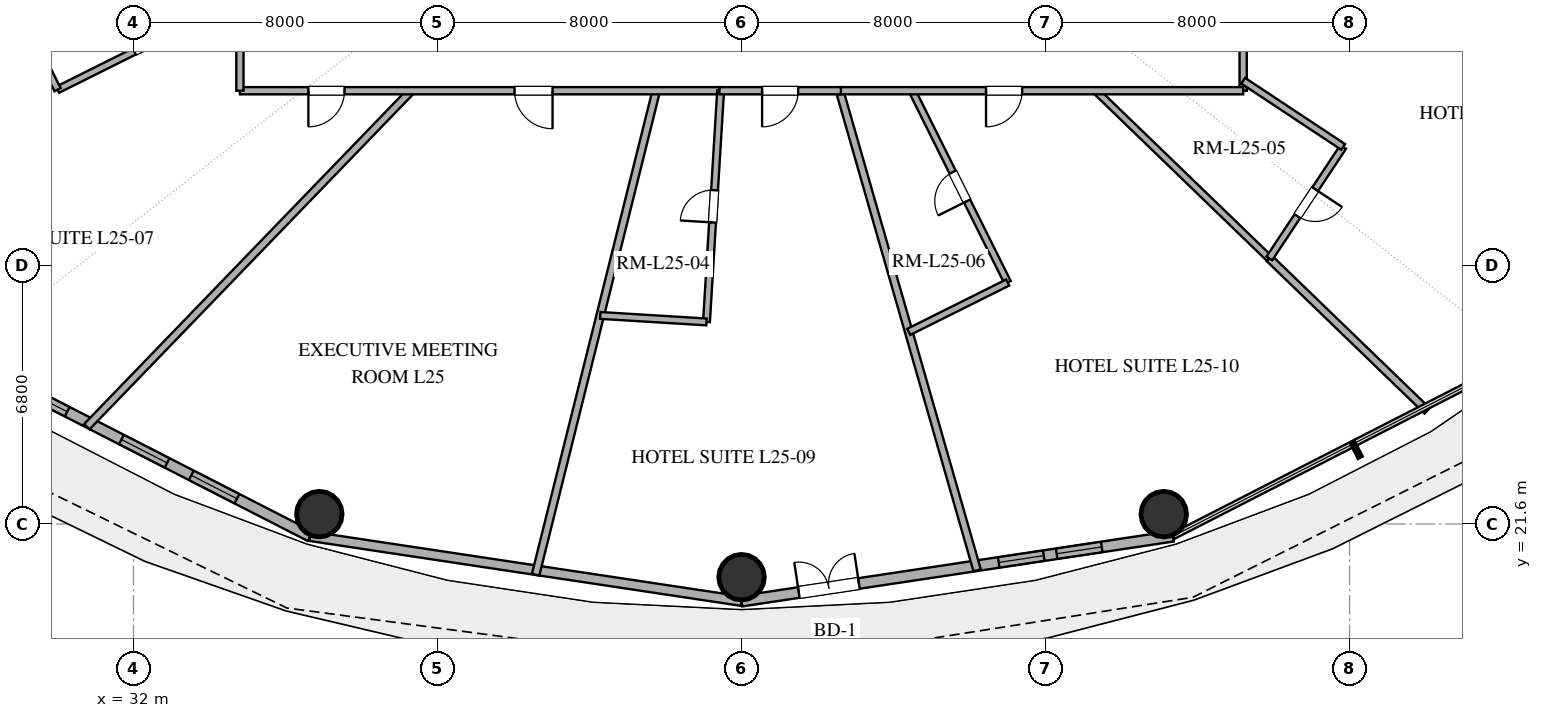
"""IFC4 building model, lengths in metres.
Left out: names, types, materials, properties, quantities, classifications, styles, units other than length and angle.
Written with IfcOpenShell. Run it as: python <this file> out.ifc"""

import sys

from ifc_helpers import new_model, si_unit, direction, frame, frame_2d, origin, origin_2d, place, context, subcontext, project, spatial, rectangle, hollow_circle, extrude, element, fill, save


model = new_model("IFC4")
c1 = context("Model", 3, precision=1e-05, world=origin(), true_north=direction((0.0, 1.0)))
c2 = subcontext(c1, "Body", "Model", "MODEL_VIEW")
j1 = project(units=[si_unit("LENGTHUNIT", "METRE"), si_unit("PLANEANGLEUNIT", "RADIAN")], contexts=[c1])
p1 = place(None, origin())
s1 = spatial("IfcSite", under=j1, at=p1, CompositionType="ELEMENT")
p2 = place(p1, origin())
s2 = spatial("IfcBuilding", under=s1, at=p2, CompositionType="ELEMENT")
p3 = place(p2, frame((0.0, 0.0, 102.0)))
s3 = spatial("IfcBuildingStorey", under=s2, at=p3, CompositionType="ELEMENT", Elevation=102.0)
for number, where, z_axis, x_axis in (
    (1, (36.89, 21.859, 0.0), (0.0, 0.0, 1.0), (1.0, 0.0, 0.0)),
    (2, (48.0, 20.2, 0.0), (0.0, 0.0, 1.0), (1.0, 0.0, 0.0)),
    (3, (59.11, 21.859, 0.0), (0.0, 0.0, 1.0), (1.0, 0.0, 0.0)),
):
    element("IfcColumn", number, at=place(p3, frame(where, z_axis=z_axis, x_axis=x_axis)), inside=s3, PredefinedType="COLUMN", context=c2, shape_type="SweptSolid", body=[
        extrude(hollow_circle(Radius=0.6, WallThickness=0.032, at=origin_2d()), origin(), (0.0, 0.0, 1.0), 3.38),
    ])
p4 = place(p3, frame((27.16, 26.14, 0.0), z_axis=(0.0, 0.0, 1.0), x_axis=(0.889959505023, -0.45603955905, 0.0)))
e4 = element("IfcWall", 4, at=p4, inside=s3, PredefinedType="SOLIDWALL", context=c2, shape_type="SweptSolid", body=[
    extrude(rectangle(XDim=10.662, YDim=0.28, at=frame_2d((5.331, 0.0))), origin(), (0.0, 0.0, 1.0), 3.38),
])
p5 = place(p4, frame((1.979, 0.0, 0.85)))
e5 = element("IfcOpeningElement", 5, at=p5, cuts=e4, PredefinedType="OPENING", context=c2, shape_type="SweptSolid", body=[
    extrude(rectangle(XDim=1.5, YDim=1.8, at=frame_2d((0.75, 0.9))), frame((0.0, 0.15, 0.0), z_axis=(0.0, -1.0, 0.0), x_axis=(1.0, 0.0, 0.0)), (0.0, 0.0, 1.0), 0.3),
])
p6 = place(p4, frame((5.082, 0.0, 0.85)))
e6 = element("IfcOpeningElement", 6, at=p6, cuts=e4, PredefinedType="OPENING", context=c2, shape_type="SweptSolid", body=[
    extrude(rectangle(XDim=1.35, YDim=1.8, at=frame_2d((0.675, 0.9))), frame((0.0, 0.15, 0.0), z_axis=(0.0, -1.0, 0.0), x_axis=(1.0, 0.0, 0.0)), (0.0, 0.0, 1.0), 0.3),
])
p7 = place(p4, frame((7.146, 0.0, 0.85)))
e7 = element("IfcOpeningElement", 7, at=p7, cuts=e4, PredefinedType="OPENING", context=c2, shape_type="SweptSolid", body=[
    extrude(rectangle(XDim=1.35, YDim=1.8, at=frame_2d((0.675, 0.9))), frame((0.0, 0.15, 0.0), z_axis=(0.0, -1.0, 0.0), x_axis=(1.0, 0.0, 0.0)), (0.0, 0.0, 1.0), 0.3),
])
p8 = place(p3, frame((36.649, 21.277, 0.0), z_axis=(0.0, 0.0, 1.0), x_axis=(0.988877774656, -0.148730450117, 0.0)))
e8 = element("IfcWall", 8, at=p8, inside=s3, PredefinedType="SOLIDWALL", context=c2, shape_type="SweptSolid", body=[
    extrude(rectangle(XDim=11.479, YDim=0.25, at=frame_2d((5.74, 0.0))), origin(), (0.0, 0.0, 1.0), 3.38),
])
p9 = place(p3, frame((48.0, 19.57, 0.0), z_axis=(0.0, 0.0, 1.0), x_axis=(0.988877774656, 0.148730450117, 0.0)))
e9 = element("IfcWall", 9, at=p9, inside=s3, PredefinedType="SOLIDWALL", context=c2, shape_type="SweptSolid", body=[
    extrude(rectangle(XDim=11.479, YDim=0.28, at=frame_2d((5.74, 0.0))), origin(), (0.0, 0.0, 1.0), 3.38),
])
p10 = place(p9, frame((1.524, 0.0, 0.0)))
e10 = element("IfcOpeningElement", 10, at=p10, cuts=e9, PredefinedType="OPENING", context=c2, shape_type="SweptSolid", body=[
    extrude(rectangle(XDim=1.6, YDim=2.25, at=frame_2d((0.8, 1.125))), frame((0.0, 0.15, 0.0), z_axis=(0.0, -1.0, 0.0), x_axis=(1.0, 0.0, 0.0)), (0.0, 0.0, 1.0), 0.3),
])
p11 = place(p9, frame((6.843, 0.0, 0.85)))
e11 = element("IfcOpeningElement", 11, at=p11, cuts=e9, PredefinedType="OPENING", context=c2, shape_type="SweptSolid", body=[
    extrude(rectangle(XDim=1.2, YDim=1.6, at=frame_2d((0.6, 0.8))), frame((0.0, 0.15, 0.0), z_axis=(0.0, -1.0, 0.0), x_axis=(1.0, 0.0, 0.0)), (0.0, 0.0, 1.0), 0.3),
])
p12 = place(p9, frame((8.385, 0.0, 0.85)))
e12 = element("IfcOpeningElement", 12, at=p12, cuts=e9, PredefinedType="OPENING", context=c2, shape_type="SweptSolid", body=[
    extrude(rectangle(XDim=1.2, YDim=1.6, at=frame_2d((0.6, 0.8))), frame((0.0, 0.15, 0.0), z_axis=(0.0, -1.0, 0.0), x_axis=(1.0, 0.0, 0.0)), (0.0, 0.0, 1.0), 0.3),
])
p13 = place(p3, frame((30.772, 24.16, 0.0), z_axis=(0.0, 0.0, 1.0), x_axis=(0.694672506389, 0.719326149161, 0.0)))
e13 = element("IfcWall", 13, at=p13, inside=s3, PredefinedType="PARTITIONING", context=c2, shape_type="SweptSolid", body=[
    extrude(rectangle(XDim=12.289, YDim=0.2, at=frame_2d((6.145, 0.0))), origin(), (0.0, 0.0, 1.0), 2.74),
])
p14 = place(p3, frame((45.756, 33.0, 0.0), z_axis=(0.0, 0.0, 1.0), x_axis=(-0.241918476077, -0.970296578852, 0.0)))
e14 = element("IfcWall", 14, at=p14, inside=s3, PredefinedType="PARTITIONING", context=c2, shape_type="SweptSolid", body=[
    extrude(rectangle(XDim=13.125, YDim=0.2, at=frame_2d((6.563, 0.0))), origin(), (0.0, 0.0, 1.0), 2.74),
])
p15 = place(p3, frame((50.581, 33.0, 0.0), z_axis=(0.0, 0.0, 1.0), x_axis=(0.275639731411, -0.961261014745, 0.0)))
e15 = element("IfcWall", 15, at=p15, inside=s3, PredefinedType="PARTITIONING", context=c2, shape_type="SweptSolid", body=[
    extrude(rectangle(XDim=13.126, YDim=0.2, at=frame_2d((6.563, 0.0))), origin(), (0.0, 0.0, 1.0), 2.74),
])
p16 = place(p3, frame((47.482, 33.0, 0.0), z_axis=(0.0, 0.0, 1.0), x_axis=(-1.0, 0.0, 0.0)))
e16 = element("IfcWall", 16, at=p16, inside=s3, PredefinedType="PARTITIONING", context=c2, shape_type="SweptSolid", body=[
    extrude(rectangle(XDim=12.682, YDim=0.19, at=frame_2d((6.341, 0.0))), origin(), (0.0, 0.0, 1.0), 2.74),
])
p17 = place(p16, frame((4.455, 0.0, 0.0)))
e17 = element("IfcOpeningElement", 17, at=p17, cuts=e16, PredefinedType="OPENING", context=c2, shape_type="SweptSolid", body=[
    extrude(rectangle(XDim=1.0, YDim=2.2, at=frame_2d((0.5, 1.1))), frame((0.0, 0.105, 0.0), z_axis=(0.0, -1.0, 0.0), x_axis=(1.0, 0.0, 0.0)), (0.0, 0.0, 1.0), 0.21),
])
p18 = place(p16, frame((9.93, 0.0, 0.0)))
e18 = element("IfcOpeningElement", 18, at=p18, cuts=e16, PredefinedType="OPENING", context=c2, shape_type="SweptSolid", body=[
    extrude(rectangle(XDim=0.95, YDim=2.15, at=frame_2d((0.475, 1.075))), frame((0.0, 0.105, 0.0), z_axis=(0.0, -1.0, 0.0), x_axis=(1.0, 0.0, 0.0)), (0.0, 0.0, 1.0), 0.21),
])
p19 = place(p3, frame((61.889, 28.587, 0.0), z_axis=(0.0, 0.0, 1.0), x_axis=(-0.719318009274, 0.694680935059, 0.0)))
e19 = element("IfcWall", 19, at=p19, inside=s3, PredefinedType="PLUMBINGWALL", context=c2, shape_type="SweptSolid", body=[
    extrude(rectangle(XDim=6.352, YDim=0.18, at=frame_2d((3.176, 0.0))), origin(), (0.0, 0.0, 1.0), 2.74),
])
p20 = place(p3, frame((47.077, 26.916, 0.0), z_axis=(0.0, 0.0, 1.0), x_axis=(0.061044096749, 0.998135070144, 0.0)))
e20 = element("IfcWall", 20, at=p20, inside=s3, PredefinedType="PLUMBINGWALL", context=c2, shape_type="SweptSolid", body=[
    extrude(rectangle(XDim=6.095, YDim=0.18, at=frame_2d((3.048, 0.0))), origin(), (0.0, 0.0, 1.0), 2.74),
])
p21 = place(p20, frame((2.623, 0.0, 0.0)))
e21 = element("IfcOpeningElement", 21, at=p21, cuts=e20, PredefinedType="OPENING", context=c2, shape_type="SweptSolid", body=[
    extrude(rectangle(XDim=0.85, YDim=2.1, at=frame_2d((0.425, 1.05))), frame((0.0, 0.1, 0.0), z_axis=(0.0, -1.0, 0.0), x_axis=(1.0, 0.0, 0.0)), (0.0, 0.0, 1.0), 0.2),
])
p22 = place(p3, frame((66.041, 24.578, 0.0), z_axis=(0.0, 0.0, 1.0), x_axis=(-0.719370121813, 0.694626970281, 0.0)))
e22 = element("IfcWall", 22, at=p22, inside=s3, PredefinedType="PARTITIONING", context=c2, shape_type="SweptSolid", body=[
    extrude(rectangle(XDim=5.772, YDim=0.2, at=frame_2d((2.886, 0.0))), origin(), (0.0, 0.0, 1.0), 2.74),
])
p23 = place(p3, frame((55.003, 27.953, 0.0), z_axis=(0.0, 0.0, 1.0), x_axis=(-0.446174269641, 0.894946099556, 0.0)))
e23 = element("IfcWall", 23, at=p23, inside=s3, PredefinedType="PLUMBINGWALL", context=c2, shape_type="SweptSolid", body=[
    extrude(rectangle(XDim=5.639, YDim=0.18, at=frame_2d((2.82, 0.0))), origin(), (0.0, 0.0, 1.0), 2.74),
])
p24 = place(p23, frame((2.395, 0.0, 0.0)))
e24 = element("IfcOpeningElement", 24, at=p24, cuts=e23, PredefinedType="OPENING", context=c2, shape_type="SweptSolid", body=[
    extrude(rectangle(XDim=0.85, YDim=2.1, at=frame_2d((0.425, 1.05))), frame((0.0, 0.1, 0.0), z_axis=(0.0, -1.0, 0.0), x_axis=(1.0, 0.0, 0.0)), (0.0, 0.0, 1.0), 0.2),
])
p25 = place(p3, frame((61.2, 41.225, 0.0), z_axis=(0.0, 0.0, 1.0), x_axis=(0.0, -1.0, 0.0)))
e25 = element("IfcWall", 25, at=p25, inside=s3, PredefinedType="PARTITIONING", context=c2, shape_type="SweptSolid", body=[
    extrude(rectangle(XDim=8.225, YDim=0.19, at=frame_2d((4.112, 0.0))), origin(), (0.0, 0.0, 1.0), 2.74),
])
p26 = place(p25, frame((4.767, 0.0, 0.0)))
e26 = element("IfcOpeningElement", 26, at=p26, cuts=e25, PredefinedType="OPENING", context=c2, shape_type="SweptSolid", body=[
    extrude(rectangle(XDim=0.95, YDim=2.15, at=frame_2d((0.475, 1.075))), frame((0.0, 0.105, 0.0), z_axis=(0.0, -1.0, 0.0), x_axis=(1.0, 0.0, 0.0)), (0.0, 0.0, 1.0), 0.21),
])
p27 = place(p3, frame((30.002, 33.027, 0.0), z_axis=(0.0, 0.0, 1.0), x_axis=(0.894936648514, 0.446193226244, 0.0)))
e27 = element("IfcWall", 27, at=p27, inside=s3, PredefinedType="PLUMBINGWALL", context=c2, shape_type="SweptSolid", body=[
    extrude(rectangle(XDim=5.361, YDim=0.18, at=frame_2d((2.681, 0.0))), origin(), (0.0, 0.0, 1.0), 2.74),
])
p28 = place(p27, frame((2.256, 0.0, 0.0)))
e28 = element("IfcOpeningElement", 28, at=p28, cuts=e27, PredefinedType="OPENING", context=c2, shape_type="SweptSolid", body=[
    extrude(rectangle(XDim=0.85, YDim=2.1, at=frame_2d((0.425, 1.05))), frame((0.0, 0.1, 0.0), z_axis=(0.0, -1.0, 0.0), x_axis=(1.0, 0.0, 0.0)), (0.0, 0.0, 1.0), 0.2),
])
p29 = place(p3, frame((61.2, 33.0, 0.0), z_axis=(0.0, 0.0, 1.0), x_axis=(-1.0, 0.0, 0.0)))
e29 = element("IfcWall", 29, at=p29, inside=s3, PredefinedType="PARTITIONING", context=c2, shape_type="SweptSolid", body=[
    extrude(rectangle(XDim=10.653, YDim=0.19, at=frame_2d((5.326, 0.0))), origin(), (0.0, 0.0, 1.0), 2.74),
])
p30 = place(p29, frame((5.816, 0.0, 0.0)))
e30 = element("IfcOpeningElement", 30, at=p30, cuts=e29, PredefinedType="OPENING", context=c2, shape_type="SweptSolid", body=[
    extrude(rectangle(XDim=0.95, YDim=2.15, at=frame_2d((0.475, 1.075))), frame((0.0, 0.105, 0.0), z_axis=(0.0, -1.0, 0.0), x_axis=(1.0, 0.0, 0.0)), (0.0, 0.0, 1.0), 0.21),
])
p31 = place(p3, frame((34.8, 33.0, 0.0), z_axis=(0.0, 0.0, 1.0), x_axis=(0.0, 1.0, 0.0)))
e31 = element("IfcWall", 31, at=p31, inside=s3, PredefinedType="PARTITIONING", context=c2, shape_type="SweptSolid", body=[
    extrude(rectangle(XDim=9.839, YDim=0.19, at=frame_2d((4.92, 0.0))), origin(), (0.0, 0.0, 1.0), 2.74),
])
p32 = place(p31, frame((7.035, 0.0, 0.0)))
e32 = element("IfcOpeningElement", 32, at=p32, cuts=e31, PredefinedType="OPENING", context=c2, shape_type="SweptSolid", body=[
    extrude(rectangle(XDim=0.95, YDim=2.15, at=frame_2d((0.475, 1.075))), frame((0.0, 0.105, 0.0), z_axis=(0.0, -1.0, 0.0), x_axis=(1.0, 0.0, 0.0)), (0.0, 0.0, 1.0), 0.21),
])
p33 = place(p3, frame((28.339, 36.362, 0.0), z_axis=(0.0, 0.0, 1.0), x_axis=(0.446243949247, -0.894911357488, 0.0)))
e33 = element("IfcWall", 33, at=p33, inside=s3, PredefinedType="PLUMBINGWALL", context=c2, shape_type="SweptSolid", body=[
    extrude(rectangle(XDim=3.727, YDim=0.18, at=frame_2d((1.864, 0.0))), origin(), (0.0, 0.0, 1.0), 2.74),
])
p34 = place(p3, frame((63.831, 31.521, 0.0), z_axis=(0.0, 0.0, 1.0), x_axis=(-0.551959146688, -0.833871153349, 0.0)))
e34 = element("IfcWall", 34, at=p34, inside=s3, PredefinedType="PLUMBINGWALL", context=c2, shape_type="SweptSolid", body=[
    extrude(rectangle(XDim=3.519, YDim=0.18, at=frame_2d((1.759, 0.0))), origin(), (0.0, 0.0, 1.0), 2.74),
])
p35 = place(p34, frame((1.334, 0.0, 0.0)))
e35 = element("IfcOpeningElement", 35, at=p35, cuts=e34, PredefinedType="OPENING", context=c2, shape_type="SweptSolid", body=[
    extrude(rectangle(XDim=0.85, YDim=2.1, at=frame_2d((0.425, 1.05))), frame((0.0, 0.1, 0.0), z_axis=(0.0, -1.0, 0.0), x_axis=(1.0, 0.0, 0.0)), (0.0, 0.0, 1.0), 0.2),
])
p36 = place(p3, frame((50.614, 33.0, 0.0), z_axis=(0.0, 0.0, 1.0), x_axis=(-1.0, 0.0, 0.0)))
e36 = element("IfcWall", 36, at=p36, inside=s3, PredefinedType="PARTITIONING", context=c2, shape_type="SweptSolid", body=[
    extrude(rectangle(XDim=3.197, YDim=0.19, at=frame_2d((1.598, 0.0))), origin(), (0.0, 0.0, 1.0), 2.74),
])
p37 = place(p36, frame((1.123, 0.0, 0.0)))
e37 = element("IfcOpeningElement", 37, at=p37, cuts=e36, PredefinedType="OPENING", context=c2, shape_type="SweptSolid", body=[
    extrude(rectangle(XDim=0.95, YDim=2.15, at=frame_2d((0.475, 1.075))), frame((0.0, 0.105, 0.0), z_axis=(0.0, -1.0, 0.0), x_axis=(1.0, 0.0, 0.0)), (0.0, 0.0, 1.0), 0.21),
])
p38 = place(p3, frame((61.2, 33.263, 0.0), z_axis=(0.0, 0.0, 1.0), x_axis=(0.833855219674, -0.5519832177, 0.0)))
e38 = element("IfcWall", 38, at=p38, inside=s3, PredefinedType="PLUMBINGWALL", context=c2, shape_type="SweptSolid", body=[
    extrude(rectangle(XDim=3.155, YDim=0.18, at=frame_2d((1.578, 0.0))), origin(), (0.0, 0.0, 1.0), 2.74),
])
p39 = place(p3, frame((52.4, 26.655, 0.0), z_axis=(0.0, 0.0, 1.0), x_axis=(0.894913437672, 0.446239777558, 0.0)))
e39 = element("IfcWall", 39, at=p39, inside=s3, PredefinedType="PLUMBINGWALL", context=c2, shape_type="SweptSolid", body=[
    extrude(rectangle(XDim=2.909, YDim=0.18, at=frame_2d((1.455, 0.0))), origin(), (0.0, 0.0, 1.0), 2.74),
])
p40 = place(p3, frame((44.282, 27.087, 0.0), z_axis=(0.0, 0.0, 1.0), x_axis=(0.998136779925, -0.061016133608, 0.0)))
e40 = element("IfcWall", 40, at=p40, inside=s3, PredefinedType="PLUMBINGWALL", context=c2, shape_type="SweptSolid", body=[
    extrude(rectangle(XDim=2.801, YDim=0.18, at=frame_2d((1.4, 0.0))), origin(), (0.0, 0.0, 1.0), 2.74),
])
p41 = place(p5, origin())
e41 = element("IfcWindow", 41, at=p41, inside=s3, PartitioningType="SINGLE_PANEL", PredefinedType="WINDOW", context=c2, shape_type="SweptSolid", body=[
    extrude(rectangle(XDim=1.5, YDim=1.8, at=frame_2d((0.75, 0.9))), frame((0.0, 0.03, 0.0), z_axis=(0.0, -1.0, 0.0), x_axis=(1.0, 0.0, 0.0)), (0.0, 0.0, 1.0), 0.06),
])
fill(e5, e41)
p42 = place(p6, origin())
e42 = element("IfcWindow", 42, at=p42, inside=s3, PartitioningType="SINGLE_PANEL", PredefinedType="WINDOW", context=c2, shape_type="SweptSolid", body=[
    extrude(rectangle(XDim=1.35, YDim=1.8, at=frame_2d((0.675, 0.9))), frame((0.0, 0.03, 0.0), z_axis=(0.0, -1.0, 0.0), x_axis=(1.0, 0.0, 0.0)), (0.0, 0.0, 1.0), 0.06),
])
fill(e6, e42)
p43 = place(p7, origin())
e43 = element("IfcWindow", 43, at=p43, inside=s3, PartitioningType="SINGLE_PANEL", PredefinedType="WINDOW", context=c2, shape_type="SweptSolid", body=[
    extrude(rectangle(XDim=1.35, YDim=1.8, at=frame_2d((0.675, 0.9))), frame((0.0, 0.03, 0.0), z_axis=(0.0, -1.0, 0.0), x_axis=(1.0, 0.0, 0.0)), (0.0, 0.0, 1.0), 0.06),
])
fill(e7, e43)
p44 = place(p10, origin())
e44 = element("IfcDoor", 44, at=p44, inside=s3, OperationType="DOUBLE_DOOR_SINGLE_SWING", PredefinedType="DOOR", context=c2, shape_type="SweptSolid", body=[
    extrude(rectangle(XDim=1.6, YDim=2.25, at=frame_2d((0.8, 1.125))), frame((0.0, 0.025, 0.0), z_axis=(0.0, -1.0, 0.0), x_axis=(1.0, 0.0, 0.0)), (0.0, 0.0, 1.0), 0.05),
])
fill(e10, e44)
p45 = place(p11, origin())
e45 = element("IfcWindow", 45, at=p45, inside=s3, PartitioningType="SINGLE_PANEL", PredefinedType="WINDOW", context=c2, shape_type="SweptSolid", body=[
    extrude(rectangle(XDim=1.2, YDim=1.6, at=frame_2d((0.6, 0.8))), frame((0.0, 0.03, 0.0), z_axis=(0.0, -1.0, 0.0), x_axis=(1.0, 0.0, 0.0)), (0.0, 0.0, 1.0), 0.06),
])
fill(e11, e45)
p46 = place(p12, origin())
e46 = element("IfcWindow", 46, at=p46, inside=s3, PartitioningType="SINGLE_PANEL", PredefinedType="WINDOW", context=c2, shape_type="SweptSolid", body=[
    extrude(rectangle(XDim=1.2, YDim=1.6, at=frame_2d((0.6, 0.8))), frame((0.0, 0.03, 0.0), z_axis=(0.0, -1.0, 0.0), x_axis=(1.0, 0.0, 0.0)), (0.0, 0.0, 1.0), 0.06),
])
fill(e12, e46)
p47 = place(p17, origin())
e47 = element("IfcDoor", 47, at=p47, inside=s3, OperationType="SINGLE_SWING_LEFT", PredefinedType="DOOR", context=c2, shape_type="SweptSolid", body=[
    extrude(rectangle(XDim=1.0, YDim=2.2, at=frame_2d((0.5, 1.1))), frame((0.0, 0.025, 0.0), z_axis=(0.0, -1.0, 0.0), x_axis=(1.0, 0.0, 0.0)), (0.0, 0.0, 1.0), 0.05),
])
fill(e17, e47)
p48 = place(p18, origin())
e48 = element("IfcDoor", 48, at=p48, inside=s3, OperationType="SINGLE_SWING_RIGHT", PredefinedType="DOOR", context=c2, shape_type="SweptSolid", body=[
    extrude(rectangle(XDim=0.95, YDim=2.15, at=frame_2d((0.475, 1.075))), frame((0.0, 0.025, 0.0), z_axis=(0.0, -1.0, 0.0), x_axis=(1.0, 0.0, 0.0)), (0.0, 0.0, 1.0), 0.05),
])
fill(e18, e48)
p49 = place(p21, origin())
e49 = element("IfcDoor", 49, at=p49, inside=s3, OperationType="SINGLE_SWING_LEFT", PredefinedType="DOOR", context=c2, shape_type="SweptSolid", body=[
    extrude(rectangle(XDim=0.85, YDim=2.1, at=frame_2d((0.425, 1.05))), frame((0.0, 0.025, 0.0), z_axis=(0.0, -1.0, 0.0), x_axis=(1.0, 0.0, 0.0)), (0.0, 0.0, 1.0), 0.05),
])
fill(e21, e49)
p50 = place(p24, origin())
e50 = element("IfcDoor", 50, at=p50, inside=s3, OperationType="SINGLE_SWING_LEFT", PredefinedType="DOOR", context=c2, shape_type="SweptSolid", body=[
    extrude(rectangle(XDim=0.85, YDim=2.1, at=frame_2d((0.425, 1.05))), frame((0.0, 0.025, 0.0), z_axis=(0.0, -1.0, 0.0), x_axis=(1.0, 0.0, 0.0)), (0.0, 0.0, 1.0), 0.05),
])
fill(e24, e50)
p51 = place(p30, origin())
e51 = element("IfcDoor", 51, at=p51, inside=s3, OperationType="SINGLE_SWING_RIGHT", PredefinedType="DOOR", context=c2, shape_type="SweptSolid", body=[
    extrude(rectangle(XDim=0.95, YDim=2.15, at=frame_2d((0.475, 1.075))), frame((0.0, 0.025, 0.0), z_axis=(0.0, -1.0, 0.0), x_axis=(1.0, 0.0, 0.0)), (0.0, 0.0, 1.0), 0.05),
])
fill(e30, e51)
p52 = place(p35, origin())
e52 = element("IfcDoor", 52, at=p52, inside=s3, OperationType="SINGLE_SWING_LEFT", PredefinedType="DOOR", context=c2, shape_type="SweptSolid", body=[
    extrude(rectangle(XDim=0.85, YDim=2.1, at=frame_2d((0.425, 1.05))), frame((0.0, 0.025, 0.0), z_axis=(0.0, -1.0, 0.0), x_axis=(1.0, 0.0, 0.0)), (0.0, 0.0, 1.0), 0.05),
])
fill(e35, e52)
p53 = place(p37, origin())
e53 = element("IfcDoor", 53, at=p53, inside=s3, OperationType="SINGLE_SWING_RIGHT", PredefinedType="DOOR", context=c2, shape_type="SweptSolid", body=[
    extrude(rectangle(XDim=0.95, YDim=2.15, at=frame_2d((0.475, 1.075))), frame((0.0, 0.025, 0.0), z_axis=(0.0, -1.0, 0.0), x_axis=(1.0, 0.0, 0.0)), (0.0, 0.0, 1.0), 0.05),
])
fill(e37, e53)
save(model, sys.argv[1])
